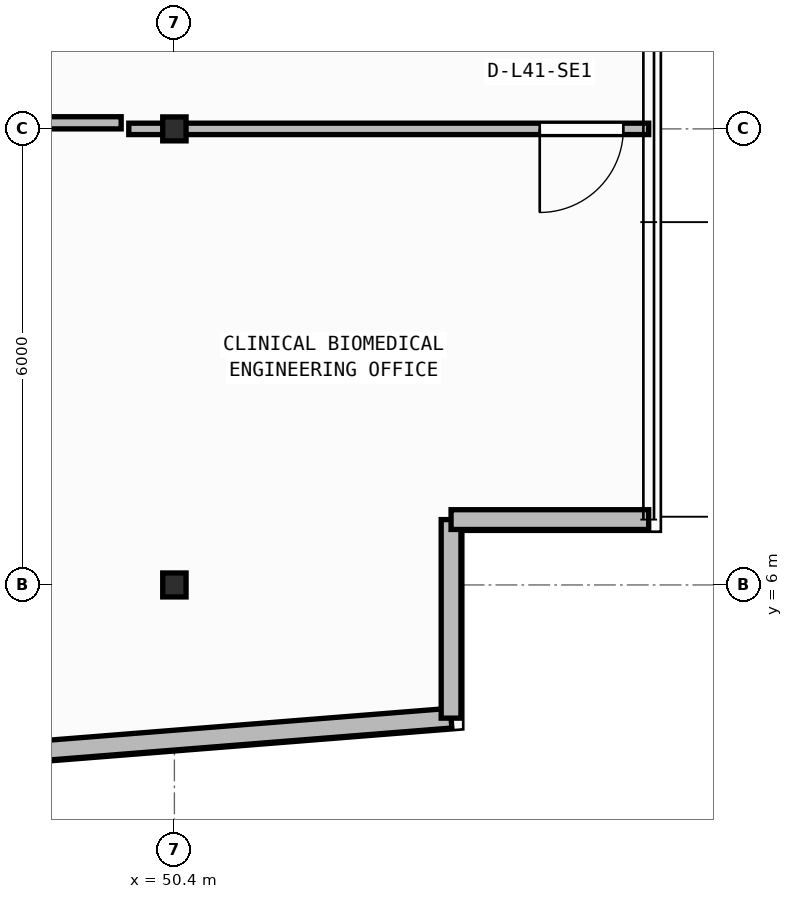
"""IFC4 building model, lengths in metres.
Left out: names, types, materials, properties, quantities, classifications, styles, units other than length and angle.
Written with IfcOpenShell. Run it as: python <this file> out.ifc"""

import sys

from ifc_helpers import new_model, si_unit, direction, frame, frame_2d, origin, origin_2d, place, context, subcontext, project, spatial, rectangle, i_section, extrude, element, fill, save


model = new_model("IFC4")
c1 = context("Model", 3, precision=1e-05, world=origin(), true_north=direction((0.0, 1.0)))
c2 = subcontext(c1, "Body", "Model", "MODEL_VIEW")
j1 = project(units=[si_unit("LENGTHUNIT", "METRE"), si_unit("PLANEANGLEUNIT", "RADIAN")], contexts=[c1])
p1 = place(None, origin())
s1 = spatial("IfcSite", under=j1, at=p1, CompositionType="ELEMENT")
p2 = place(p1, origin())
s2 = spatial("IfcBuilding", under=s1, at=p2, CompositionType="ELEMENT")
p3 = place(p2, frame((0.0, 0.0, 166.55)))
s3 = spatial("IfcBuildingStorey", under=s2, at=p3, CompositionType="ELEMENT", Elevation=166.55)
for number, where, z_axis, x_axis in (
    (1, (50.4, 6.0, 0.0), (0.0, 0.0, 1.0), (1.0, 0.0, 0.0)),
    (2, (50.4, 12.0, 0.0), (0.0, 0.0, 1.0), (1.0, 0.0, 0.0)),
):
    element("IfcColumn", number, at=place(p3, frame(where, z_axis=z_axis, x_axis=x_axis)), inside=s3, PredefinedType="COLUMN", context=c2, shape_type="SweptSolid", body=[
        extrude(i_section(OverallWidth=0.307, OverallDepth=0.315, WebThickness=0.012, FlangeThickness=0.019, FilletRadius=0.017, at=origin_2d()), origin(), (0.0, 0.0, 1.0), 3.95),
    ])
p4 = place(p3, frame((2.76, 0.173, 0.0), z_axis=(0.0, 0.0, 1.0), x_axis=(0.996857931723, 0.079210251617, 0.0)))
e3 = element("IfcWall", 3, at=p4, inside=s3, PredefinedType="STANDARD", context=c2, shape_type="SweptSolid", body=[
    extrude(rectangle(XDim=51.442, YDim=0.26, at=frame_2d((25.721, 0.0))), origin(), (0.0, 0.0, 1.0), 3.71),
])
p5 = place(p4, frame((24.521, 0.0, 0.9)))
e4 = element("IfcOpeningElement", 4, at=p5, cuts=e3, PredefinedType="OPENING", context=c2, shape_type="SweptSolid", body=[
    extrude(rectangle(XDim=2.4, YDim=1.65, at=frame_2d((1.2, 0.825))), frame((0.0, 0.14, 0.0), z_axis=(0.0, -1.0, 0.0), x_axis=(1.0, 0.0, 0.0)), (0.0, 0.0, 1.0), 0.28),
])
p6 = place(p3, frame((54.04, 4.248, 0.0), z_axis=(0.0, 0.0, 1.0), x_axis=(0.0, 1.0, 0.0)))
e5 = element("IfcWall", 5, at=p6, inside=s3, PredefinedType="STANDARD", context=c2, shape_type="SweptSolid", body=[
    extrude(rectangle(XDim=2.612, YDim=0.26, at=frame_2d((1.306, 0.0))), origin(), (0.0, 0.0, 1.0), 3.71),
])
p7 = place(p3, frame((54.04, 6.86, 0.0), z_axis=(0.0, 0.0, 1.0), x_axis=(1.0, 0.0, 0.0)))
e6 = element("IfcWall", 6, at=p7, inside=s3, PredefinedType="STANDARD", context=c2, shape_type="SweptSolid", body=[
    extrude(rectangle(XDim=2.6, YDim=0.26, at=frame_2d((1.3, 0.0))), origin(), (0.0, 0.0, 1.0), 3.71),
])
p8 = place(p3, frame((56.64, 12.0, 0.0), z_axis=(0.0, 0.0, 1.0), x_axis=(-1.0, 0.0, 0.0)))
e7 = element("IfcWall", 7, at=p8, inside=s3, PredefinedType="PARTITIONING", context=c2, shape_type="SweptSolid", body=[
    extrude(rectangle(XDim=6.84, YDim=0.15, at=frame_2d((3.42, 0.0))), origin(), (0.0, 0.0, 1.0), 3.083),
])
p9 = place(p8, frame((0.333, 0.0, 0.0)))
e8 = element("IfcOpeningElement", 8, at=p9, cuts=e7, PredefinedType="OPENING", context=c2, shape_type="SweptSolid", body=[
    extrude(rectangle(XDim=1.1, YDim=2.1, at=frame_2d((0.55, 1.05))), frame((0.0, 0.085, 0.0), z_axis=(0.0, -1.0, 0.0), x_axis=(1.0, 0.0, 0.0)), (0.0, 0.0, 1.0), 0.17),
])
p10 = place(p3, frame((46.689, 12.08, 0.0), z_axis=(0.0, 0.0, 1.0), x_axis=(1.0, 0.0, 0.0)))
e9 = element("IfcWall", 9, at=p10, inside=s3, PredefinedType="PARTITIONING", context=c2, shape_type="SweptSolid", body=[
    extrude(rectangle(XDim=3.011, YDim=0.16, at=frame_2d((1.505, 0.0))), origin(), (0.0, 0.0, 1.0), 3.083),
])
p11 = place(p9, origin())
e10 = element("IfcDoor", 10, at=p11, inside=s3, OperationType="SINGLE_SWING_RIGHT", PredefinedType="DOOR", context=c2, shape_type="SweptSolid", body=[
    extrude(rectangle(XDim=1.1, YDim=2.1, at=frame_2d((0.55, 1.05))), frame((0.0, 0.025, 0.0), z_axis=(0.0, -1.0, 0.0), x_axis=(1.0, 0.0, 0.0)), (0.0, 0.0, 1.0), 0.05),
])
fill(e8, e10)
save(model, sys.argv[1])
